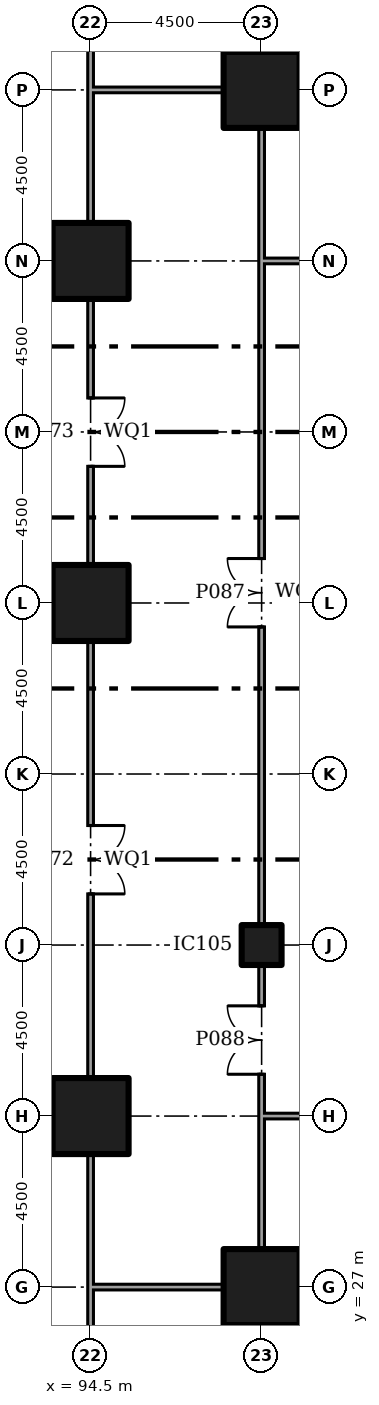
"""IFC4 building model, lengths in metres.
Left out: names, types, materials, properties, quantities, classifications, styles, units other than length and angle.
Written with IfcOpenShell. Run it as: python <this file> out.ifc"""

import sys

from ifc_helpers import new_model, si_unit, direction, frame, frame_2d, origin, origin_2d, place, context, subcontext, project, spatial, rectangle, extrude, element, fill, save


model = new_model("IFC4")
c1 = context("Model", 3, precision=1e-05, world=origin(), true_north=direction((0.0, 1.0)))
c2 = subcontext(c1, "Body", "Model", "MODEL_VIEW")
j1 = project(units=[si_unit("LENGTHUNIT", "METRE"), si_unit("PLANEANGLEUNIT", "RADIAN")], contexts=[c1])
p1 = place(None, origin())
s1 = spatial("IfcSite", under=j1, at=p1, CompositionType="ELEMENT")
p2 = place(p1, origin())
s2 = spatial("IfcBuilding", under=s1, at=p2, CompositionType="ELEMENT")
p3 = place(p2, origin())
s3 = spatial("IfcBuildingStorey", under=s2, at=p3, CompositionType="ELEMENT", Elevation=0.0)
for number, where in (
    (1, (94.5, 31.5, 0.0)),
    (2, (94.5, 45.0, 0.0)),
    (3, (94.5, 54.0, 0.0)),
    (4, (99.0, 27.0, 0.0)),
    (5, (99.0, 58.5, 0.0)),
):
    element("IfcColumn", number, at=place(p3, frame(where)), inside=s3, PredefinedType="COLUMN", context=c2, shape_type="SweptSolid", body=[
        extrude(rectangle(XDim=2.0, YDim=2.0, at=origin_2d()), origin(), (0.0, 0.0, 1.0), 6.0),
    ])
p4 = place(p3, frame((99.0, 36.0, 0.0)))
e6 = element("IfcColumn", 6, at=p4, inside=s3, PredefinedType="COLUMN", context=c2, shape_type="SweptSolid", body=[
    extrude(rectangle(XDim=1.05, YDim=1.05, at=origin_2d()), origin(), (0.0, 0.0, 1.0), 6.0),
])
p5 = place(p3, frame((94.5, 26.925, 0.0), z_axis=(0.0, 0.0, 1.0), x_axis=(0.0, 1.0, 0.0)))
e7 = element("IfcWall", 7, at=p5, inside=s3, PredefinedType="PARTITIONING", context=c2, shape_type="SweptSolid", body=[
    extrude(rectangle(XDim=3.58, YDim=0.15, at=frame_2d((1.79, 0.0))), origin(), (0.0, 0.0, 1.0), 5.55),
])
p6 = place(p3, frame((94.5, 32.495, 0.0), z_axis=(0.0, 0.0, 1.0), x_axis=(0.0, 1.0, 0.0)))
e8 = element("IfcWall", 8, at=p6, inside=s3, PredefinedType="PARTITIONING", context=c2, shape_type="SweptSolid", body=[
    extrude(rectangle(XDim=11.51, YDim=0.15, at=frame_2d((5.755, 0.0))), origin(), (0.0, 0.0, 1.0), 5.55),
])
p7 = place(p6, frame((4.85, 0.0, 0.0)))
e9 = element("IfcOpeningElement", 9, at=p7, cuts=e8, PredefinedType="OPENING", context=c2, shape_type="SweptSolid", body=[
    extrude(rectangle(XDim=1.8, YDim=2.1, at=frame_2d((0.9, 1.05))), frame((0.0, 0.085, 0.0), z_axis=(0.0, -1.0, 0.0), x_axis=(1.0, 0.0, 0.0)), (0.0, 0.0, 1.0), 0.17),
])
p8 = place(p3, frame((94.5, 45.995, 0.0), z_axis=(0.0, 0.0, 1.0), x_axis=(0.0, 1.0, 0.0)))
e10 = element("IfcWall", 10, at=p8, inside=s3, PredefinedType="PARTITIONING", context=c2, shape_type="SweptSolid", body=[
    extrude(rectangle(XDim=7.01, YDim=0.15, at=frame_2d((3.505, 0.0))), origin(), (0.0, 0.0, 1.0), 5.55),
])
p9 = place(p8, frame((2.6, 0.0, 0.0)))
e11 = element("IfcOpeningElement", 11, at=p9, cuts=e10, PredefinedType="OPENING", context=c2, shape_type="SweptSolid", body=[
    extrude(rectangle(XDim=1.8, YDim=2.1, at=frame_2d((0.9, 1.05))), frame((0.0, 0.085, 0.0), z_axis=(0.0, -1.0, 0.0), x_axis=(1.0, 0.0, 0.0)), (0.0, 0.0, 1.0), 0.17),
])
p10 = place(p3, frame((94.5, 54.995, 0.0), z_axis=(0.0, 0.0, 1.0), x_axis=(0.0, 1.0, 0.0)))
e12 = element("IfcWall", 12, at=p10, inside=s3, PredefinedType="PARTITIONING", context=c2, shape_type="SweptSolid", body=[
    extrude(rectangle(XDim=3.58, YDim=0.15, at=frame_2d((1.79, 0.0))), origin(), (0.0, 0.0, 1.0), 5.55),
])
p11 = place(p3, frame((94.5, 22.5, 0.0), z_axis=(0.0, 0.0, 1.0), x_axis=(0.0, 1.0, 0.0)))
e13 = element("IfcWall", 13, at=p11, inside=s3, PredefinedType="PARTITIONING", context=c2, shape_type="SweptSolid", body=[
    extrude(rectangle(XDim=4.5, YDim=0.15, at=frame_2d((2.25, 0.0))), origin(), (0.0, 0.0, 1.0), 5.55),
])
p12 = place(p3, frame((94.5, 58.5, 0.0), z_axis=(0.0, 0.0, 1.0), x_axis=(0.0, 1.0, 0.0)))
e14 = element("IfcWall", 14, at=p12, inside=s3, PredefinedType="PARTITIONING", context=c2, shape_type="SweptSolid", body=[
    extrude(rectangle(XDim=17.925, YDim=0.15, at=frame_2d((8.962, 0.0))), origin(), (0.0, 0.0, 1.0), 5.55),
])
p13 = place(p12, frame((8.5, 0.0, 0.0)))
e15 = element("IfcOpeningElement", 15, at=p13, cuts=e14, PredefinedType="OPENING", context=c2, shape_type="SweptSolid", body=[
    extrude(rectangle(XDim=1.0, YDim=2.1, at=frame_2d((0.5, 1.05))), frame((0.0, 0.085, 0.0), z_axis=(0.0, -1.0, 0.0), x_axis=(1.0, 0.0, 0.0)), (0.0, 0.0, 1.0), 0.17),
])
p14 = place(p3, frame((99.0, 31.425, 0.0), z_axis=(0.0, 0.0, 1.0), x_axis=(0.0, 1.0, 0.0)))
e16 = element("IfcWall", 16, at=p14, inside=s3, PredefinedType="PARTITIONING", context=c2, shape_type="SweptSolid", body=[
    extrude(rectangle(XDim=4.055, YDim=0.15, at=frame_2d((2.027, 0.0))), origin(), (0.0, 0.0, 1.0), 5.55),
])
p15 = place(p14, frame((1.175, 0.0, 0.0)))
e17 = element("IfcOpeningElement", 17, at=p15, cuts=e16, PredefinedType="OPENING", context=c2, shape_type="SweptSolid", body=[
    extrude(rectangle(XDim=1.8, YDim=2.1, at=frame_2d((0.9, 1.05))), frame((0.0, 0.085, 0.0), z_axis=(0.0, -1.0, 0.0), x_axis=(1.0, 0.0, 0.0)), (0.0, 0.0, 1.0), 0.17),
])
p16 = place(p3, frame((99.0, 36.52, 0.0), z_axis=(0.0, 0.0, 1.0), x_axis=(0.0, 1.0, 0.0)))
e18 = element("IfcWall", 18, at=p16, inside=s3, PredefinedType="PARTITIONING", context=c2, shape_type="SweptSolid", body=[
    extrude(rectangle(XDim=17.555, YDim=0.15, at=frame_2d((8.777, 0.0))), origin(), (0.0, 0.0, 1.0), 5.55),
])
p17 = place(p16, frame((7.85, 0.0, 0.0)))
e19 = element("IfcOpeningElement", 19, at=p17, cuts=e18, PredefinedType="OPENING", context=c2, shape_type="SweptSolid", body=[
    extrude(rectangle(XDim=1.8, YDim=2.1, at=frame_2d((0.9, 1.05))), frame((0.0, 0.085, 0.0), z_axis=(0.0, -1.0, 0.0), x_axis=(1.0, 0.0, 0.0)), (0.0, 0.0, 1.0), 0.17),
])
for number, where, z_axis, x_axis in (
    (20, (99.0, 27.995, 0.0), (0.0, 0.0, 1.0), (0.0, 1.0, 0.0)),
    (21, (99.0, 54.0, 0.0), (0.0, 0.0, 1.0), (0.0, 1.0, 0.0)),
):
    element("IfcWall", number, at=place(p3, frame(where, z_axis=z_axis, x_axis=x_axis)), inside=s3, PredefinedType="PARTITIONING", context=c2, shape_type="SweptSolid", body=[
        extrude(rectangle(XDim=3.505, YDim=0.15, at=frame_2d((1.752, 0.0))), origin(), (0.0, 0.0, 1.0), 5.55),
    ])
for number, where in (
    (22, (94.575, 27.0, 0.0)),
    (23, (94.575, 58.5, 0.0)),
):
    element("IfcWall", number, at=place(p3, frame(where)), inside=s3, PredefinedType="PARTITIONING", context=c2, shape_type="SweptSolid", body=[
        extrude(rectangle(XDim=3.43, YDim=0.15, at=frame_2d((1.715, 0.0))), origin(), (0.0, 0.0, 1.0), 5.55),
    ])
p18 = place(p3, frame((99.075, 31.5, 0.0)))
e24 = element("IfcWall", 24, at=p18, inside=s3, PredefinedType="PARTITIONING", context=c2, shape_type="SweptSolid", body=[
    extrude(rectangle(XDim=13.5, YDim=0.15, at=frame_2d((6.75, 0.0))), origin(), (0.0, 0.0, 1.0), 5.55),
])
p19 = place(p18, frame((6.175, 0.0, 0.0)))
e25 = element("IfcOpeningElement", 25, at=p19, cuts=e24, PredefinedType="OPENING", context=c2, shape_type="SweptSolid", body=[
    extrude(rectangle(XDim=1.0, YDim=2.1, at=frame_2d((0.5, 1.05))), frame((0.0, 0.085, 0.0), z_axis=(0.0, -1.0, 0.0), x_axis=(1.0, 0.0, 0.0)), (0.0, 0.0, 1.0), 0.17),
])
p20 = place(p3, frame((99.075, 54.0, 0.0)))
e26 = element("IfcWall", 26, at=p20, inside=s3, PredefinedType="PARTITIONING", context=c2, shape_type="SweptSolid", body=[
    extrude(rectangle(XDim=3.905, YDim=0.15, at=frame_2d((1.953, 0.0))), origin(), (0.0, 0.0, 1.0), 5.55),
])
for number, where in (
    (27, (99.995, 27.0, 0.0)),
    (28, (99.995, 58.5, 0.0)),
):
    element("IfcWall", number, at=place(p3, frame(where)), inside=s3, PredefinedType="PARTITIONING", context=c2, shape_type="SweptSolid", body=[
        extrude(rectangle(XDim=11.51, YDim=0.15, at=frame_2d((5.755, 0.0))), origin(), (0.0, 0.0, 1.0), 5.55),
    ])
p21 = place(p7, frame((1.8, 0.0, 0.0), x_axis=(-1.0, 0.0, 0.0)))
e29 = element("IfcDoor", 29, at=p21, inside=s3, OperationType="DOUBLE_DOOR_SINGLE_SWING", PredefinedType="DOOR", context=c2, shape_type="SweptSolid", body=[
    extrude(rectangle(XDim=1.8, YDim=2.1, at=frame_2d((0.9, 1.05))), frame((0.0, 0.025, 0.0), z_axis=(0.0, -1.0, 0.0), x_axis=(1.0, 0.0, 0.0)), (0.0, 0.0, 1.0), 0.05),
])
fill(e9, e29)
p22 = place(p9, frame((1.8, 0.0, 0.0), x_axis=(-1.0, 0.0, 0.0)))
e30 = element("IfcDoor", 30, at=p22, inside=s3, OperationType="DOUBLE_DOOR_SINGLE_SWING", PredefinedType="DOOR", context=c2, shape_type="SweptSolid", body=[
    extrude(rectangle(XDim=1.8, YDim=2.1, at=frame_2d((0.9, 1.05))), frame((0.0, 0.025, 0.0), z_axis=(0.0, -1.0, 0.0), x_axis=(1.0, 0.0, 0.0)), (0.0, 0.0, 1.0), 0.05),
])
fill(e11, e30)
p23 = place(p17, origin())
e31 = element("IfcDoor", 31, at=p23, inside=s3, OperationType="DOUBLE_DOOR_SINGLE_SWING", PredefinedType="DOOR", context=c2, shape_type="SweptSolid", body=[
    extrude(rectangle(XDim=1.8, YDim=2.1, at=frame_2d((0.9, 1.05))), frame((0.0, 0.025, 0.0), z_axis=(0.0, -1.0, 0.0), x_axis=(1.0, 0.0, 0.0)), (0.0, 0.0, 1.0), 0.05),
])
fill(e19, e31)
p24 = place(p15, origin())
e32 = element("IfcDoor", 32, at=p24, inside=s3, OperationType="DOUBLE_DOOR_SINGLE_SWING", PredefinedType="DOOR", context=c2, shape_type="SweptSolid", body=[
    extrude(rectangle(XDim=1.8, YDim=2.1, at=frame_2d((0.9, 1.05))), frame((0.0, 0.025, 0.0), z_axis=(0.0, -1.0, 0.0), x_axis=(1.0, 0.0, 0.0)), (0.0, 0.0, 1.0), 0.05),
])
fill(e17, e32)
save(model, sys.argv[1])
